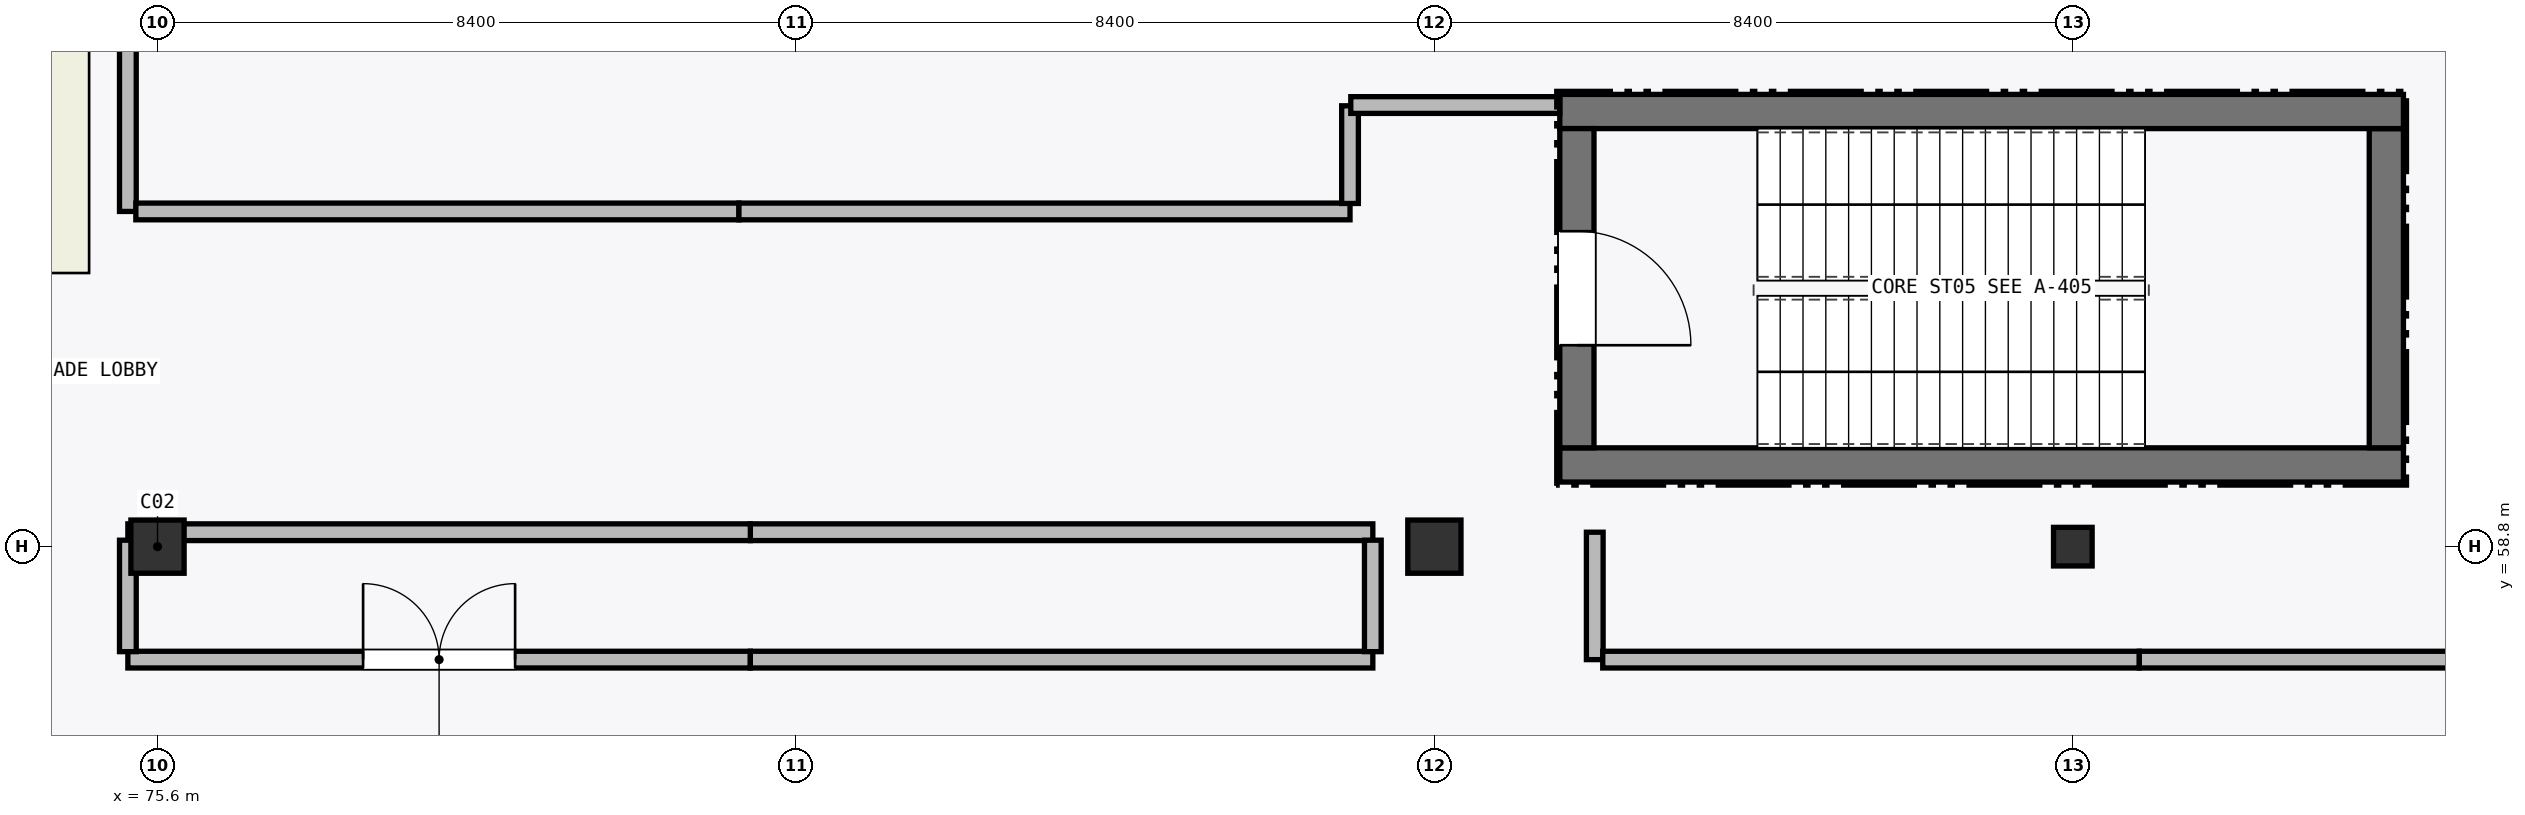
"""IFC4 building model, lengths in metres.
Left out: names, types, materials, properties, quantities, classifications, styles, units other than length and angle.
Written with IfcOpenShell. Run it as: python <this file> out.ifc"""

import sys

from ifc_helpers import new_model, si_unit, direction, frame, frame_2d, origin, origin_2d, place, context, subcontext, project, spatial, rectangle, hollow_rectangle, hollow_circle, extrude, element, fill, save


model = new_model("IFC4")
c1 = context("Model", 3, precision=1e-05, world=origin(), true_north=direction((0.0, 1.0)))
c2 = subcontext(c1, "Body", "Model", "MODEL_VIEW")
j1 = project(units=[si_unit("LENGTHUNIT", "METRE"), si_unit("PLANEANGLEUNIT", "RADIAN")], contexts=[c1])
p1 = place(None, origin())
s1 = spatial("IfcSite", under=j1, at=p1, CompositionType="ELEMENT")
p2 = place(p1, origin())
s2 = spatial("IfcBuilding", under=s1, at=p2, CompositionType="ELEMENT")
p3 = place(p2, frame((0.0, 0.0, -5.4)))
s3 = spatial("IfcBuildingStorey", under=s2, at=p3, CompositionType="ELEMENT", Elevation=-5.4)
for number, where, z_axis, x_axis in (
    (1, (75.6, 58.8, 0.0), (0.0, 0.0, 1.0), (1.0, 0.0, 0.0)),
    (2, (92.4, 58.8, 0.0), (0.0, 0.0, 1.0), (1.0, 0.0, 0.0)),
):
    element("IfcColumn", number, at=place(p3, frame(where, z_axis=z_axis, x_axis=x_axis)), inside=s3, PredefinedType="COLUMN", context=c2, shape_type="SweptSolid", body=[
        extrude(hollow_rectangle(XDim=0.7, YDim=0.7, WallThickness=0.026, at=origin_2d()), origin(), (0.0, 0.0, 1.0), 5.4),
    ])
p4 = place(p3, frame((100.8, 58.8, 0.0), z_axis=(0.0, 0.0, 1.0), x_axis=(1.0, 0.0, 0.0)))
e3 = element("IfcColumn", 3, at=p4, inside=s3, PredefinedType="COLUMN", context=c2, shape_type="SweptSolid", body=[
    extrude(hollow_circle(Radius=0.254, WallThickness=0.016, at=origin_2d()), origin(), (0.0, 0.0, 1.0), 5.4),
])
p5 = place(p3, frame((94.05, 59.875, 0.0), z_axis=(0.0, 0.0, 1.0), x_axis=(1.0, 0.0, 0.0)))
e4 = element("IfcWall", 4, at=p5, inside=s3, PredefinedType="SHEAR", context=c2, shape_type="SweptSolid", body=[
    extrude(rectangle(XDim=11.1, YDim=0.45, at=frame_2d((5.55, 0.0))), origin(), (0.0, 0.0, 1.0), 5.145),
])
p6 = place(p3, frame((104.925, 60.1, 0.0), z_axis=(0.0, 0.0, 1.0), x_axis=(0.0, 1.0, 0.0)))
e5 = element("IfcWall", 5, at=p6, inside=s3, PredefinedType="SHEAR", context=c2, shape_type="SweptSolid", body=[
    extrude(rectangle(XDim=4.2, YDim=0.45, at=frame_2d((2.1, 0.0))), origin(), (0.0, 0.0, 1.0), 5.145),
])
p7 = place(p3, frame((105.15, 64.525, 0.0), z_axis=(0.0, 0.0, 1.0), x_axis=(-1.0, 0.0, 0.0)))
e6 = element("IfcWall", 6, at=p7, inside=s3, PredefinedType="SHEAR", context=c2, shape_type="SweptSolid", body=[
    extrude(rectangle(XDim=11.1, YDim=0.45, at=frame_2d((5.55, 0.0))), origin(), (0.0, 0.0, 1.0), 5.145),
])
p8 = place(p3, frame((94.275, 64.3, 0.0), z_axis=(0.0, 0.0, 1.0), x_axis=(0.0, -1.0, 0.0)))
e7 = element("IfcWall", 7, at=p8, inside=s3, PredefinedType="SHEAR", context=c2, shape_type="SweptSolid", body=[
    extrude(rectangle(XDim=4.2, YDim=0.45, at=frame_2d((2.1, 0.0))), origin(), (0.0, 0.0, 1.0), 5.145),
])
p9 = place(p8, frame((1.35, 0.0, 0.0)))
e8 = element("IfcOpeningElement", 8, at=p9, cuts=e7, PredefinedType="OPENING", context=c2, shape_type="SweptSolid", body=[
    extrude(rectangle(XDim=1.5, YDim=2.15, at=frame_2d((0.75, 1.075))), frame((0.0, 0.235, 0.0), z_axis=(0.0, -1.0, 0.0), x_axis=(1.0, 0.0, 0.0)), (0.0, 0.0, 1.0), 0.47),
])
p10 = place(p3, frame((75.21, 57.314, 0.0), z_axis=(0.0, 0.0, 1.0), x_axis=(1.0, 0.0, 0.0)))
e9 = element("IfcWall", 9, at=p10, inside=s3, PredefinedType="PARTITIONING", context=c2, shape_type="SweptSolid", body=[
    extrude(rectangle(XDim=8.19, YDim=0.22, at=frame_2d((4.095, 0.0))), origin(), (0.0, 0.0, 1.0), 5.145),
])
p11 = place(p10, frame((3.095, 0.0, 0.0)))
e10 = element("IfcOpeningElement", 10, at=p11, cuts=e9, PredefinedType="OPENING", context=c2, shape_type="SweptSolid", body=[
    extrude(rectangle(XDim=2.0, YDim=2.2, at=frame_2d((1.0, 1.1))), frame((0.0, 0.12, 0.0), z_axis=(0.0, -1.0, 0.0), x_axis=(1.0, 0.0, 0.0)), (0.0, 0.0, 1.0), 0.24),
])
p12 = place(p3, frame((83.4, 57.314, 0.0), z_axis=(0.0, 0.0, 1.0), x_axis=(1.0, 0.0, 0.0)))
e11 = element("IfcWall", 11, at=p12, inside=s3, PredefinedType="PARTITIONING", context=c2, shape_type="SweptSolid", body=[
    extrude(rectangle(XDim=8.19, YDim=0.22, at=frame_2d((4.095, 0.0))), origin(), (0.0, 0.0, 1.0), 5.145),
])
p13 = place(p3, frame((91.59, 58.99, 0.0), z_axis=(0.0, 0.0, 1.0), x_axis=(-1.0, 0.0, 0.0)))
e12 = element("IfcWall", 12, at=p13, inside=s3, PredefinedType="PARTITIONING", context=c2, shape_type="SweptSolid", body=[
    extrude(rectangle(XDim=8.19, YDim=0.22, at=frame_2d((4.095, 0.0))), origin(), (0.0, 0.0, 1.0), 4.222),
])
p14 = place(p3, frame((83.4, 58.99, 0.0), z_axis=(0.0, 0.0, 1.0), x_axis=(-1.0, 0.0, 0.0)))
e13 = element("IfcWall", 13, at=p14, inside=s3, PredefinedType="PARTITIONING", context=c2, shape_type="SweptSolid", body=[
    extrude(rectangle(XDim=8.19, YDim=0.22, at=frame_2d((4.095, 0.0))), origin(), (0.0, 0.0, 1.0), 4.222),
])
for number, where, z_axis, x_axis in (
    (14, (75.21, 58.885, 0.0), (0.0, 0.0, 1.0), (0.0, -1.0, 0.0)),
    (15, (91.59, 57.419, 0.0), (0.0, 0.0, 1.0), (0.0, 1.0, 0.0)),
):
    element("IfcWall", number, at=place(p3, frame(where, z_axis=z_axis, x_axis=x_axis)), inside=s3, PredefinedType="PARTITIONING", context=c2, shape_type="SweptSolid", body=[
        extrude(rectangle(XDim=1.466, YDim=0.22, at=frame_2d((0.733, 0.0))), origin(), (0.0, 0.0, 1.0), 5.145),
    ])
p15 = place(p3, frame((75.21, 71.528, 0.0), z_axis=(0.0, 0.0, 1.0), x_axis=(0.0, -1.0, 0.0)))
e16 = element("IfcWall", 16, at=p15, inside=s3, PredefinedType="PARTITIONING", context=c2, shape_type="SweptSolid", body=[
    extrude(rectangle(XDim=8.318, YDim=0.22, at=frame_2d((4.159, 0.0))), origin(), (0.0, 0.0, 1.0), 5.145),
])
p16 = place(p3, frame((75.315, 63.21, 0.0), z_axis=(0.0, 0.0, 1.0), x_axis=(1.0, 0.0, 0.0)))
e17 = element("IfcWall", 17, at=p16, inside=s3, PredefinedType="PARTITIONING", context=c2, shape_type="SweptSolid", body=[
    extrude(rectangle(XDim=7.935, YDim=0.22, at=frame_2d((3.968, 0.0))), origin(), (0.0, 0.0, 1.0), 5.145),
])
p17 = place(p3, frame((83.25, 63.21, 0.0), z_axis=(0.0, 0.0, 1.0), x_axis=(1.0, 0.0, 0.0)))
e18 = element("IfcWall", 18, at=p17, inside=s3, PredefinedType="PARTITIONING", context=c2, shape_type="SweptSolid", body=[
    extrude(rectangle(XDim=8.04, YDim=0.22, at=frame_2d((4.02, 0.0))), origin(), (0.0, 0.0, 1.0), 5.145),
])
p18 = place(p3, frame((91.29, 63.315, 0.0), z_axis=(0.0, 0.0, 1.0), x_axis=(0.0, 1.0, 0.0)))
e19 = element("IfcWall", 19, at=p18, inside=s3, PredefinedType="PARTITIONING", context=c2, shape_type="SweptSolid", body=[
    extrude(rectangle(XDim=1.285, YDim=0.22, at=frame_2d((0.643, 0.0))), origin(), (0.0, 0.0, 1.0), 5.145),
])
p19 = place(p3, frame((94.51, 58.99, 0.0), z_axis=(0.0, 0.0, 1.0), x_axis=(0.0, -1.0, 0.0)))
e20 = element("IfcWall", 20, at=p19, inside=s3, PredefinedType="PARTITIONING", context=c2, shape_type="SweptSolid", body=[
    extrude(rectangle(XDim=1.676, YDim=0.22, at=frame_2d((0.838, 0.0))), origin(), (0.0, 0.0, 1.0), 5.145),
])
p20 = place(p3, frame((94.615, 57.314, 0.0), z_axis=(0.0, 0.0, 1.0), x_axis=(1.0, 0.0, 0.0)))
e21 = element("IfcWall", 21, at=p20, inside=s3, PredefinedType="PARTITIONING", context=c2, shape_type="SweptSolid", body=[
    extrude(rectangle(XDim=7.06, YDim=0.22, at=frame_2d((3.53, 0.0))), origin(), (0.0, 0.0, 1.0), 5.145),
])
p21 = place(p3, frame((101.675, 57.314, 0.0), z_axis=(0.0, 0.0, 1.0), x_axis=(1.0, 0.0, 0.0)))
e22 = element("IfcWall", 22, at=p21, inside=s3, PredefinedType="PARTITIONING", context=c2, shape_type="SweptSolid", body=[
    extrude(rectangle(XDim=7.117, YDim=0.22, at=frame_2d((3.559, 0.0))), origin(), (0.0, 0.0, 1.0), 5.145),
])
p22 = place(p3, frame((91.3, 64.61, 0.0), z_axis=(0.0, 0.0, 1.0), x_axis=(1.0, 0.0, 0.0)))
e23 = element("IfcWall", 23, at=p22, inside=s3, PredefinedType="PARTITIONING", context=c2, shape_type="SweptSolid", body=[
    extrude(rectangle(XDim=2.75, YDim=0.22, at=frame_2d((1.375, 0.0))), origin(), (0.0, 0.0, 1.0), 5.145),
])
p23 = place(p9, origin())
e24 = element("IfcDoor", 24, at=p23, inside=s3, OperationType="SINGLE_SWING_RIGHT", PredefinedType="DOOR", context=c2, shape_type="SweptSolid", body=[
    extrude(rectangle(XDim=1.5, YDim=2.15, at=frame_2d((0.75, 1.075))), frame((0.0, 0.025, 0.0), z_axis=(0.0, -1.0, 0.0), x_axis=(1.0, 0.0, 0.0)), (0.0, 0.0, 1.0), 0.05),
])
fill(e8, e24)
p24 = place(p11, origin())
e25 = element("IfcDoor", 25, at=p24, inside=s3, OperationType="DOUBLE_DOOR_SINGLE_SWING", PredefinedType="DOOR", context=c2, shape_type="SweptSolid", body=[
    extrude(rectangle(XDim=2.0, YDim=2.2, at=frame_2d((1.0, 1.1))), frame((0.0, 0.025, 0.0), z_axis=(0.0, -1.0, 0.0), x_axis=(1.0, 0.0, 0.0)), (0.0, 0.0, 1.0), 0.05),
])
fill(e10, e25)
save(model, sys.argv[1])
